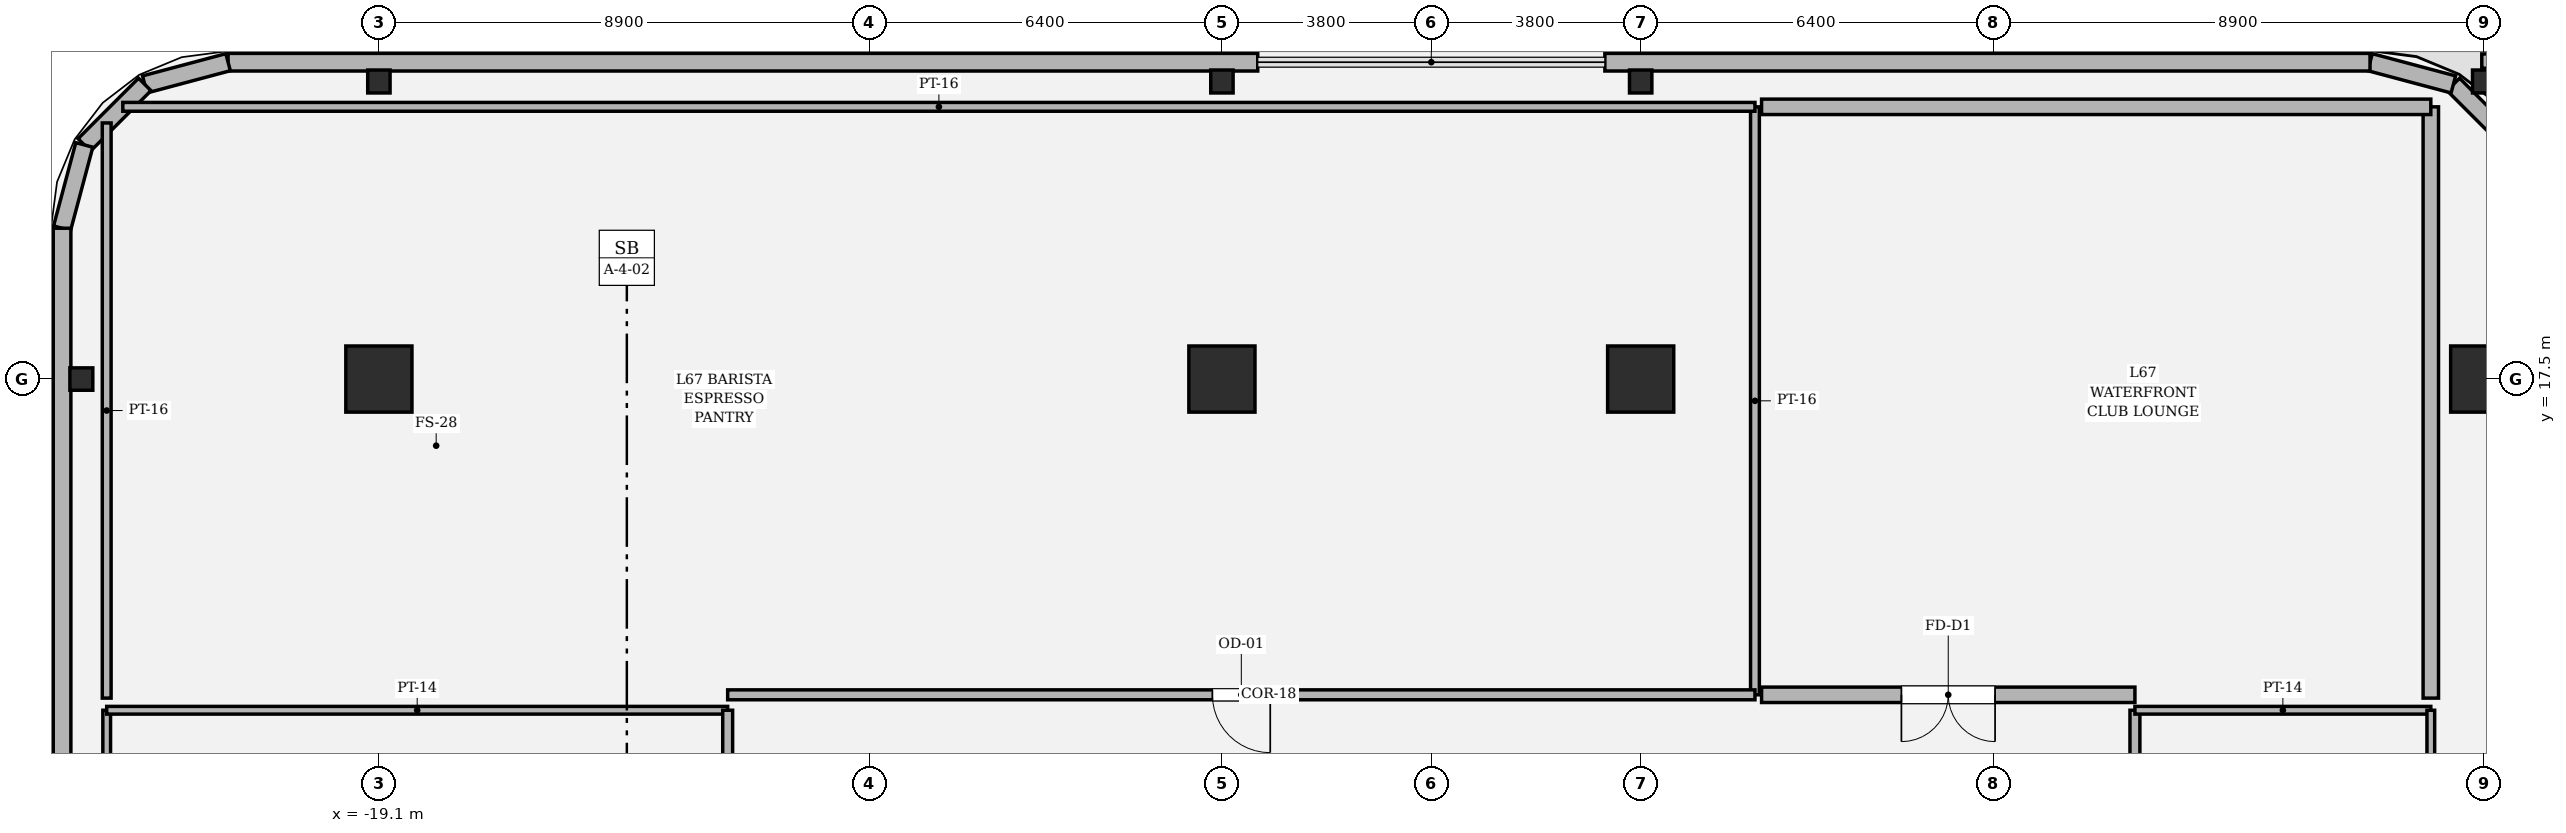
"""IFC4 building model, lengths in metres.
Left out: names, types, materials, properties, quantities, classifications, styles, units other than length and angle.
Written with IfcOpenShell. Run it as: python <this file> out.ifc"""

import sys

from ifc_helpers import new_model, si_unit, direction, frame, frame_2d, origin, origin_2d, place, context, subcontext, project, spatial, rectangle, hollow_rectangle, i_section, extrude, element, fill, save


model = new_model("IFC4")
c1 = context("Model", 3, precision=1e-05, world=origin(), true_north=direction((0.0, 1.0)))
c2 = subcontext(c1, "Body", "Model", "MODEL_VIEW")
j1 = project(units=[si_unit("LENGTHUNIT", "METRE"), si_unit("PLANEANGLEUNIT", "RADIAN")], contexts=[c1])
p1 = place(None, origin())
s1 = spatial("IfcSite", under=j1, at=p1, CompositionType="ELEMENT")
p2 = place(p1, origin())
s2 = spatial("IfcBuilding", under=s1, at=p2, CompositionType="ELEMENT")
p3 = place(p2, frame((0.0, 0.0, 283.8)))
s3 = spatial("IfcBuildingStorey", under=s2, at=p3, CompositionType="ELEMENT", Elevation=283.8)
for number, where, z_axis, x_axis in (
    (1, (19.1, 17.5, 0.0), (0.0, 0.0, 1.0), (1.0, 0.0, 0.0)),
    (2, (3.8, 17.5, 0.0), (0.0, 0.0, 1.0), (1.0, 0.0, 0.0)),
    (3, (-3.8, 17.5, 0.0), (0.0, 0.0, 1.0), (1.0, 0.0, 0.0)),
    (4, (-19.1, 17.5, 0.0), (0.0, 0.0, 1.0), (1.0, 0.0, 0.0)),
):
    element("IfcColumn", number, at=place(p3, frame(where, z_axis=z_axis, x_axis=x_axis)), inside=s3, PredefinedType="COLUMN", context=c2, shape_type="SweptSolid", body=[
        extrude(hollow_rectangle(XDim=1.2, YDim=1.2, WallThickness=0.035, at=origin_2d()), origin(), (0.0, 0.0, 1.0), 4.2),
    ])
for number, where, z_axis, x_axis in (
    (5, (-19.1, 22.9, 0.0), (0.0, 0.0, 1.0), (1.0, 0.0, 0.0)),
    (6, (-3.8, 22.9, 0.0), (0.0, 0.0, 1.0), (1.0, 0.0, 0.0)),
    (7, (3.8, 22.9, 0.0), (0.0, 0.0, 1.0), (1.0, 0.0, 0.0)),
    (8, (19.1, 22.9, 0.0), (0.0, 0.0, 1.0), (1.0, 0.0, 0.0)),
    (9, (-24.5, 17.5, 0.0), (0.0, 0.0, 1.0), (0.0, 1.0, 0.0)),
):
    element("IfcColumn", number, at=place(p3, frame(where, z_axis=z_axis, x_axis=x_axis)), inside=s3, PredefinedType="COLUMN", context=c2, shape_type="SweptSolid", body=[
        extrude(i_section(OverallWidth=0.406, OverallDepth=0.416, WebThickness=0.029, FlangeThickness=0.048, FilletRadius=0.018, at=origin_2d()), origin(), (0.0, 0.0, 1.0), 4.198),
    ])
p4 = place(p3, frame((19.646, 21.749, 0.0), z_axis=(0.0, 0.0, 1.0), x_axis=(-0.707028130747, 0.707185422879, 0.0)))
e10 = element("IfcWall", 10, at=p4, inside=s3, PredefinedType="SOLIDWALL", context=c2, shape_type="SweptSolid", body=[
    extrude(rectangle(XDim=1.552, YDim=0.32, at=frame_2d((0.776, 0.0))), origin(), (0.0, 0.0, 1.0), 2.674),
])
p5 = place(p3, frame((18.549, 22.847, 0.0), z_axis=(0.0, 0.0, 1.0), x_axis=(-0.966224582397, 0.257701486942, 0.0)))
e11 = element("IfcWall", 11, at=p5, inside=s3, PredefinedType="SOLIDWALL", context=c2, shape_type="SweptSolid", body=[
    extrude(rectangle(XDim=1.565, YDim=0.32, at=frame_2d((0.783, 0.0))), origin(), (0.0, 0.0, 1.0), 2.714),
])
p6 = place(p3, frame((17.037, 23.25, 0.0), z_axis=(0.0, 0.0, 1.0), x_axis=(-1.0, 0.0, 0.0)))
e12 = element("IfcWall", 12, at=p6, inside=s3, PredefinedType="SOLIDWALL", context=c2, shape_type="SweptSolid", body=[
    extrude(rectangle(XDim=13.887, YDim=0.32, at=frame_2d((6.943, 0.0))), origin(), (0.0, 0.0, 1.0), 2.714),
])
p7 = place(p3, frame((-3.15, 23.25, 0.0), z_axis=(0.0, 0.0, 1.0), x_axis=(-1.0, 0.0, 0.0)))
e13 = element("IfcWall", 13, at=p7, inside=s3, PredefinedType="SOLIDWALL", context=c2, shape_type="SweptSolid", body=[
    extrude(rectangle(XDim=18.687, YDim=0.32, at=frame_2d((9.344, 0.0))), origin(), (0.0, 0.0, 1.0), 2.714),
])
p8 = place(p3, frame((-21.837, 23.25, 0.0), z_axis=(0.0, 0.0, 1.0), x_axis=(-0.966224582397, -0.257701486942, 0.0)))
e14 = element("IfcWall", 14, at=p8, inside=s3, PredefinedType="SOLIDWALL", context=c2, shape_type="SweptSolid", body=[
    extrude(rectangle(XDim=1.565, YDim=0.32, at=frame_2d((0.783, 0.0))), origin(), (0.0, 0.0, 1.0), 4.0),
])
p9 = place(p3, frame((-23.349, 22.847, 0.0), z_axis=(0.0, 0.0, 1.0), x_axis=(-0.707028130747, -0.707185422879, 0.0)))
e15 = element("IfcWall", 15, at=p9, inside=s3, PredefinedType="SOLIDWALL", context=c2, shape_type="SweptSolid", body=[
    extrude(rectangle(XDim=1.552, YDim=0.32, at=frame_2d((0.776, 0.0))), origin(), (0.0, 0.0, 1.0), 4.0),
])
p10 = place(p3, frame((-24.447, 21.749, 0.0), z_axis=(0.0, 0.0, 1.0), x_axis=(-0.257847112249, -0.966185730957, 0.0)))
e16 = element("IfcWall", 16, at=p10, inside=s3, PredefinedType="SOLIDWALL", context=c2, shape_type="SweptSolid", body=[
    extrude(rectangle(XDim=1.565, YDim=0.32, at=frame_2d((0.783, 0.0))), origin(), (0.0, 0.0, 1.0), 4.0),
])
p11 = place(p3, frame((-24.85, 20.237, 0.0), z_axis=(0.0, 0.0, 1.0), x_axis=(0.0, -1.0, 0.0)))
e17 = element("IfcWall", 17, at=p11, inside=s3, PredefinedType="SOLIDWALL", context=c2, shape_type="SweptSolid", body=[
    extrude(rectangle(XDim=17.487, YDim=0.32, at=frame_2d((8.743, 0.0))), origin(), (0.0, 0.0, 1.0), 2.714),
])
p12 = place(p3, frame((21.838, 23.27, 0.0), z_axis=(0.0, 0.0, 1.0), x_axis=(-1.0, 0.0, 0.0)))
e18 = element("IfcWall", 18, at=p12, inside=s3, PredefinedType="PARAPET", context=c2, shape_type="SweptSolid", body=[
    extrude(rectangle(XDim=2.773, YDim=0.26, at=frame_2d((1.386, 0.0))), origin(), (0.0, 0.0, 1.0), 1.2),
])
p13 = place(p3, frame((-24.04, -11.49, 0.0), z_axis=(0.0, 0.0, 1.0), x_axis=(0.0, 1.0, 0.0)))
e19 = element("IfcWall", 19, at=p13, inside=s3, PredefinedType="PARTITIONING", context=c2, shape_type="SweptSolid", body=[
    extrude(rectangle(XDim=22.98, YDim=0.14, at=frame_2d((11.49, 0.0))), origin(), (0.0, 0.0, 1.0), 2.674),
])
p14 = place(p3, frame((-24.04, 11.49, 0.0), z_axis=(0.0, 0.0, 1.0), x_axis=(1.0, 0.0, 0.0)))
e20 = element("IfcWall", 20, at=p14, inside=s3, PredefinedType="PARTITIONING", context=c2, shape_type="SweptSolid", body=[
    extrude(rectangle(XDim=11.27, YDim=0.14, at=frame_2d((5.635, 0.0))), origin(), (0.0, 0.0, 1.0), 3.394),
])
p15 = place(p3, frame((-12.77, 11.49, 0.0), z_axis=(0.0, 0.0, 1.0), x_axis=(0.0, -1.0, 0.0)))
e21 = element("IfcWall", 21, at=p15, inside=s3, PredefinedType="PARTITIONING", context=c2, shape_type="SweptSolid", body=[
    extrude(rectangle(XDim=22.98, YDim=0.18, at=frame_2d((11.49, 0.0))), origin(), (0.0, 0.0, 1.0), 3.394),
])
p16 = place(p15, frame((10.965, 0.0, 0.0)))
e22 = element("IfcOpeningElement", 22, at=p16, cuts=e21, PredefinedType="OPENING", context=c2, shape_type="SweptSolid", body=[
    extrude(rectangle(XDim=1.05, YDim=2.2, at=frame_2d((0.525, 1.1))), frame((0.0, 0.1, 0.0), z_axis=(0.0, -1.0, 0.0), x_axis=(1.0, 0.0, 0.0)), (0.0, 0.0, 1.0), 0.2),
])
p17 = place(p3, frame((12.77, 4.218, 0.0), z_axis=(0.0, 0.0, 1.0), x_axis=(0.0, 1.0, 0.0)))
e23 = element("IfcWall", 23, at=p17, inside=s3, PredefinedType="PARTITIONING", context=c2, shape_type="SweptSolid", body=[
    extrude(rectangle(XDim=7.272, YDim=0.18, at=frame_2d((3.636, 0.0))), origin(), (0.0, 0.0, 1.0), 3.394),
])
p18 = place(p17, frame((3.111, 0.0, 0.0)))
e24 = element("IfcOpeningElement", 24, at=p18, cuts=e23, PredefinedType="OPENING", context=c2, shape_type="SweptSolid", body=[
    extrude(rectangle(XDim=1.05, YDim=2.2, at=frame_2d((0.525, 1.1))), frame((0.0, 0.1, 0.0), z_axis=(0.0, -1.0, 0.0), x_axis=(1.0, 0.0, 0.0)), (0.0, 0.0, 1.0), 0.2),
])
p19 = place(p3, frame((12.77, 11.49, 0.0), z_axis=(0.0, 0.0, 1.0), x_axis=(1.0, 0.0, 0.0)))
e25 = element("IfcWall", 25, at=p19, inside=s3, PredefinedType="PARTITIONING", context=c2, shape_type="SweptSolid", body=[
    extrude(rectangle(XDim=5.37, YDim=0.14, at=frame_2d((2.685, 0.0))), origin(), (0.0, 0.0, 1.0), 3.634),
])
p20 = place(p3, frame((18.14, 11.49, 0.0), z_axis=(0.0, 0.0, 1.0), x_axis=(0.0, -1.0, 0.0)))
e26 = element("IfcWall", 26, at=p20, inside=s3, PredefinedType="PARTITIONING", context=c2, shape_type="SweptSolid", body=[
    extrude(rectangle(XDim=7.272, YDim=0.14, at=frame_2d((3.636, 0.0))), origin(), (0.0, 0.0, 1.0), 3.394),
])
p21 = place(p3, frame((5.874, 22.44, 0.0), z_axis=(0.0, 0.0, 1.0), x_axis=(0.0, -1.0, 0.0)))
e27 = element("IfcWall", 27, at=p21, inside=s3, PredefinedType="PARTITIONING", context=c2, shape_type="SweptSolid", body=[
    extrude(rectangle(XDim=10.67, YDim=0.16, at=frame_2d((5.335, 0.0))), origin(), (0.0, 0.0, 1.0), 3.394),
])
p22 = place(p3, frame((5.874, 11.77, 0.0), z_axis=(0.0, 0.0, 1.0), x_axis=(-1.0, 0.0, 0.0)))
e28 = element("IfcWall", 28, at=p22, inside=s3, PredefinedType="PARTITIONING", context=c2, shape_type="SweptSolid", body=[
    extrude(rectangle(XDim=18.644, YDim=0.18, at=frame_2d((9.322, 0.0))), origin(), (0.0, 0.0, 1.0), 3.394),
])
p23 = place(p22, frame((8.797, 0.0, 0.0)))
e29 = element("IfcOpeningElement", 29, at=p23, cuts=e28, PredefinedType="OPENING", context=c2, shape_type="SweptSolid", body=[
    extrude(rectangle(XDim=1.05, YDim=2.2, at=frame_2d((0.525, 1.1))), frame((0.0, 0.1, 0.0), z_axis=(0.0, -1.0, 0.0), x_axis=(1.0, 0.0, 0.0)), (0.0, 0.0, 1.0), 0.2),
])
p24 = place(p3, frame((-24.04, 11.71, 0.0), z_axis=(0.0, 0.0, 1.0), x_axis=(0.0, 1.0, 0.0)))
e30 = element("IfcWall", 30, at=p24, inside=s3, PredefinedType="PARTITIONING", context=c2, shape_type="SweptSolid", body=[
    extrude(rectangle(XDim=10.438, YDim=0.16, at=frame_2d((5.219, 0.0))), origin(), (0.0, 0.0, 1.0), 2.674),
])
p25 = place(p3, frame((-23.748, 22.44, 0.0), z_axis=(0.0, 0.0, 1.0), x_axis=(1.0, 0.0, 0.0)))
e31 = element("IfcWall", 31, at=p25, inside=s3, PredefinedType="PARTITIONING", context=c2, shape_type="SweptSolid", body=[
    extrude(rectangle(XDim=29.622, YDim=0.16, at=frame_2d((14.811, 0.0))), origin(), (0.0, 0.0, 1.0), 2.674),
])
p26 = place(p3, frame((18.14, 22.44, 0.0), z_axis=(0.0, 0.0, 1.0), x_axis=(0.0, -1.0, 0.0)))
e32 = element("IfcWall", 32, at=p26, inside=s3, PredefinedType="SOLIDWALL", context=c2, shape_type="SweptSolid", body=[
    extrude(rectangle(XDim=10.73, YDim=0.28, at=frame_2d((5.365, 0.0))), origin(), (0.0, 0.0, 1.0), 3.394),
])
p27 = place(p3, frame((12.77, 11.77, 0.0), z_axis=(0.0, 0.0, 1.0), x_axis=(-1.0, 0.0, 0.0)))
e33 = element("IfcWall", 33, at=p27, inside=s3, PredefinedType="SOLIDWALL", context=c2, shape_type="SweptSolid", body=[
    extrude(rectangle(XDim=6.776, YDim=0.28, at=frame_2d((3.388, 0.0))), origin(), (0.0, 0.0, 1.0), 3.394),
])
p28 = place(p27, frame((2.538, 0.0, 0.0)))
e34 = element("IfcOpeningElement", 34, at=p28, cuts=e33, PredefinedType="OPENING", context=c2, shape_type="SweptSolid", body=[
    extrude(rectangle(XDim=1.7, YDim=2.3, at=frame_2d((0.85, 1.15))), frame((0.0, 0.15, 0.0), z_axis=(0.0, -1.0, 0.0), x_axis=(1.0, 0.0, 0.0)), (0.0, 0.0, 1.0), 0.3),
])
p29 = place(p3, frame((5.994, 22.44, 0.0), z_axis=(0.0, 0.0, 1.0), x_axis=(1.0, 0.0, 0.0)))
e35 = element("IfcWall", 35, at=p29, inside=s3, PredefinedType="SOLIDWALL", context=c2, shape_type="SweptSolid", body=[
    extrude(rectangle(XDim=12.146, YDim=0.28, at=frame_2d((6.073, 0.0))), origin(), (0.0, 0.0, 1.0), 4.0),
])
p30 = place(p23, origin())
e36 = element("IfcDoor", 36, at=p30, inside=s3, OperationType="SINGLE_SWING_LEFT", PredefinedType="DOOR", context=c2, shape_type="SweptSolid", body=[
    extrude(rectangle(XDim=1.05, YDim=2.2, at=frame_2d((0.525, 1.1))), frame((0.0, 0.025, 0.0), z_axis=(0.0, -1.0, 0.0), x_axis=(1.0, 0.0, 0.0)), (0.0, 0.0, 1.0), 0.05),
])
fill(e29, e36)
p31 = place(p28, origin())
e37 = element("IfcDoor", 37, at=p31, inside=s3, OperationType="DOUBLE_DOOR_SINGLE_SWING", PredefinedType="DOOR", context=c2, shape_type="SweptSolid", body=[
    extrude(rectangle(XDim=1.7, YDim=2.3, at=frame_2d((0.85, 1.15))), frame((0.0, 0.025, 0.0), z_axis=(0.0, -1.0, 0.0), x_axis=(1.0, 0.0, 0.0)), (0.0, 0.0, 1.0), 0.05),
])
fill(e34, e37)
save(model, sys.argv[1])
